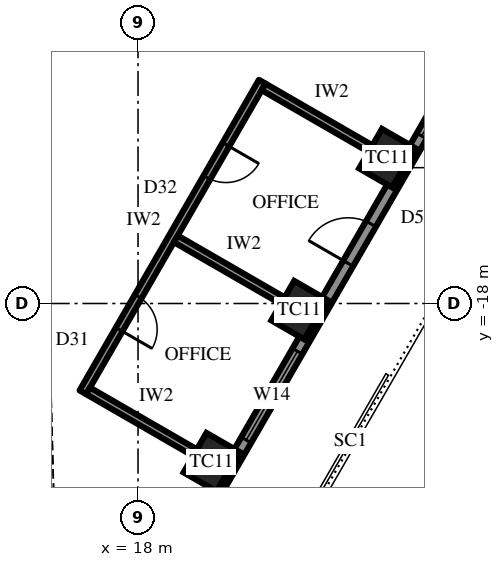
"""IFC4 building model, lengths in metres.
Left out: names, types, materials, properties, quantities, classifications, styles, units other than length and angle.
Written with IfcOpenShell. Run it as: python <this file> out.ifc"""

import sys

from ifc_helpers import new_model, si_unit, direction, frame, frame_2d, origin, origin_2d, place, context, subcontext, project, spatial, rectangle, extrude, element, fill, save


model = new_model("IFC4")
c1 = context("Model", 3, precision=1e-05, world=origin(), true_north=direction((0.0, 1.0)))
c2 = subcontext(c1, "Body", "Model", "MODEL_VIEW")
j1 = project(units=[si_unit("LENGTHUNIT", "METRE"), si_unit("PLANEANGLEUNIT", "RADIAN")], contexts=[c1])
p1 = place(None, origin())
s1 = spatial("IfcSite", under=j1, at=p1, CompositionType="ELEMENT")
p2 = place(p1, origin())
s2 = spatial("IfcBuilding", under=s1, at=p2, CompositionType="ELEMENT")
p3 = place(p2, frame((0.0, 0.0, 274.3)))
s3 = spatial("IfcBuildingStorey", under=s2, at=p3, CompositionType="ELEMENT", Elevation=274.3)
for number, where, z_axis, x_axis in (
    (1, (19.933, -22.175, 0.0), (0.0, 0.0, 1.0), (0.5, 0.866, 0.0)),
    (2, (22.242, -18.175, 0.0), (0.0, 0.0, 1.0), (0.5, 0.866, 0.0)),
    (3, (24.552, -14.175, 0.0), (0.0, 0.0, 1.0), (0.5, 0.866, 0.0)),
):
    element("IfcColumn", number, at=place(p3, frame(where, z_axis=z_axis, x_axis=x_axis)), inside=s3, PredefinedType="COLUMN", context=c2, shape_type="SweptSolid", body=[
        extrude(rectangle(XDim=1.2, YDim=1.0, at=origin_2d()), origin(), (0.0, 0.0, 1.0), 4.2),
    ])
p4 = place(p3, frame((18.707, -25.299, 0.0), z_axis=(0.0, 0.0, 1.0), x_axis=(0.500000442367, 0.866025148383, 0.0)))
e4 = element("IfcWall", 4, at=p4, inside=s3, PredefinedType="SOLIDWALL", context=c2, shape_type="SweptSolid", body=[
    extrude(rectangle(XDim=25.113, YDim=0.3, at=frame_2d((12.556, 0.0))), origin(), (0.0, 0.0, 1.0), 2.8),
])
p5 = place(p4, frame((4.278, 0.0, 0.6)))
e5 = element("IfcOpeningElement", 5, at=p5, cuts=e4, PredefinedType="OPENING", context=c2, shape_type="SweptSolid", body=[
    extrude(rectangle(XDim=2.7, YDim=1.95, at=frame_2d((1.35, 0.975))), frame((0.0, 0.16, 0.0), z_axis=(0.0, -1.0, 0.0), x_axis=(1.0, 0.0, 0.0)), (0.0, 0.0, 1.0), 0.32),
])
p6 = place(p4, frame((9.647, 0.0, 0.0)))
e6 = element("IfcOpeningElement", 6, at=p6, cuts=e4, PredefinedType="OPENING", context=c2, shape_type="SweptSolid", body=[
    extrude(rectangle(XDim=1.2, YDim=2.4, at=frame_2d((0.6, 1.2))), frame((0.0, 0.16, 0.0), z_axis=(0.0, -1.0, 0.0), x_axis=(1.0, 0.0, 0.0)), (0.0, 0.0, 1.0), 0.32),
])
p7 = place(p4, frame((13.516, 0.0, 0.6)))
e7 = element("IfcOpeningElement", 7, at=p7, cuts=e4, PredefinedType="OPENING", context=c2, shape_type="SweptSolid", body=[
    extrude(rectangle(XDim=2.7, YDim=1.95, at=frame_2d((1.35, 0.975))), frame((0.0, 0.16, 0.0), z_axis=(0.0, -1.0, 0.0), x_axis=(1.0, 0.0, 0.0)), (0.0, 0.0, 1.0), 0.32),
])
p8 = place(p4, frame((18.135, 0.0, 0.6)))
e8 = element("IfcOpeningElement", 8, at=p8, cuts=e4, PredefinedType="OPENING", context=c2, shape_type="SweptSolid", body=[
    extrude(rectangle(XDim=2.7, YDim=1.95, at=frame_2d((1.35, 0.975))), frame((0.0, 0.16, 0.0), z_axis=(0.0, -1.0, 0.0), x_axis=(1.0, 0.0, 0.0)), (0.0, 0.0, 1.0), 0.32),
])
p9 = place(p3, frame((16.549, -20.337, 0.0), z_axis=(0.0, 0.0, 1.0), x_axis=(0.499989672313, 0.866031366395, 0.0)))
e9 = element("IfcWall", 9, at=p9, inside=s3, PredefinedType="PARTITIONING", context=c2, shape_type="SweptSolid", body=[
    extrude(rectangle(XDim=9.438, YDim=0.2, at=frame_2d((4.719, 0.0))), origin(), (0.0, 0.0, 1.0), 4.0),
])
p10 = place(p9, frame((1.909, 0.0, 0.0)))
e10 = element("IfcOpeningElement", 10, at=p10, cuts=e9, PredefinedType="OPENING", context=c2, shape_type="SweptSolid", body=[
    extrude(rectangle(XDim=1.0, YDim=2.2, at=frame_2d((0.5, 1.1))), frame((0.0, 0.11, 0.0), z_axis=(0.0, -1.0, 0.0), x_axis=(1.0, 0.0, 0.0)), (0.0, 0.0, 1.0), 0.22),
])
p11 = place(p9, frame((6.528, 0.0, 0.0)))
e11 = element("IfcOpeningElement", 11, at=p11, cuts=e9, PredefinedType="OPENING", context=c2, shape_type="SweptSolid", body=[
    extrude(rectangle(XDim=1.0, YDim=2.2, at=frame_2d((0.5, 1.1))), frame((0.0, 0.11, 0.0), z_axis=(0.0, -1.0, 0.0), x_axis=(1.0, 0.0, 0.0)), (0.0, 0.0, 1.0), 0.22),
])
for number, where, z_axis, x_axis in (
    (12, (16.685, -20.3, 0.0), (0.0, 0.0, 1.0), (0.866, -0.5, 0.0)),
    (13, (18.995, -16.3, 0.0), (0.0, 0.0, 1.0), (0.866, -0.5, 0.0)),
    (14, (21.304, -12.3, 0.0), (0.0, 0.0, 1.0), (0.866, -0.5, 0.0)),
):
    element("IfcWall", number, at=place(p3, frame(where, z_axis=z_axis, x_axis=x_axis)), inside=s3, PredefinedType="PARTITIONING", context=c2, shape_type="SweptSolid", body=[
        extrude(rectangle(XDim=3.25, YDim=0.2, at=frame_2d((1.625, 0.0))), origin(), (0.0, 0.0, 1.0), 3.082),
    ])
p12 = place(p5, origin())
e15 = element("IfcWindow", 15, at=p12, inside=s3, PartitioningType="SINGLE_PANEL", PredefinedType="WINDOW", context=c2, shape_type="SweptSolid", body=[
    extrude(rectangle(XDim=2.7, YDim=1.95, at=frame_2d((1.35, 0.975))), frame((0.0, 0.03, 0.0), z_axis=(0.0, -1.0, 0.0), x_axis=(1.0, 0.0, 0.0)), (0.0, 0.0, 1.0), 0.06),
])
fill(e5, e15)
p13 = place(p6, origin())
e16 = element("IfcDoor", 16, at=p13, inside=s3, OperationType="SINGLE_SWING_RIGHT", PredefinedType="DOOR", context=c2, shape_type="SweptSolid", body=[
    extrude(rectangle(XDim=1.2, YDim=2.4, at=frame_2d((0.6, 1.2))), frame((0.0, 0.025, 0.0), z_axis=(0.0, -1.0, 0.0), x_axis=(1.0, 0.0, 0.0)), (0.0, 0.0, 1.0), 0.05),
])
fill(e6, e16)
p14 = place(p7, origin())
e17 = element("IfcWindow", 17, at=p14, inside=s3, PartitioningType="SINGLE_PANEL", PredefinedType="WINDOW", context=c2, shape_type="SweptSolid", body=[
    extrude(rectangle(XDim=2.7, YDim=1.95, at=frame_2d((1.35, 0.975))), frame((0.0, 0.03, 0.0), z_axis=(0.0, -1.0, 0.0), x_axis=(1.0, 0.0, 0.0)), (0.0, 0.0, 1.0), 0.06),
])
fill(e7, e17)
p15 = place(p10, frame((1.0, 0.0, 0.0), z_axis=(0.0, 0.0, 1.0), x_axis=(-1.0, 0.0, 0.0)))
e18 = element("IfcDoor", 18, at=p15, inside=s3, OperationType="SINGLE_SWING_LEFT", PredefinedType="DOOR", context=c2, shape_type="SweptSolid", body=[
    extrude(rectangle(XDim=1.0, YDim=2.2, at=frame_2d((0.5, 1.1))), frame((0.0, 0.025, 0.0), z_axis=(0.0, -1.0, 0.0), x_axis=(1.0, 0.0, 0.0)), (0.0, 0.0, 1.0), 0.05),
])
fill(e10, e18)
p16 = place(p11, frame((1.0, 0.0, 0.0), z_axis=(0.0, 0.0, 1.0), x_axis=(-1.0, 0.0, 0.0)))
e19 = element("IfcDoor", 19, at=p16, inside=s3, OperationType="SINGLE_SWING_RIGHT", PredefinedType="DOOR", context=c2, shape_type="SweptSolid", body=[
    extrude(rectangle(XDim=1.0, YDim=2.2, at=frame_2d((0.5, 1.1))), frame((0.0, 0.025, 0.0), z_axis=(0.0, -1.0, 0.0), x_axis=(1.0, 0.0, 0.0)), (0.0, 0.0, 1.0), 0.05),
])
fill(e11, e19)
save(model, sys.argv[1])
